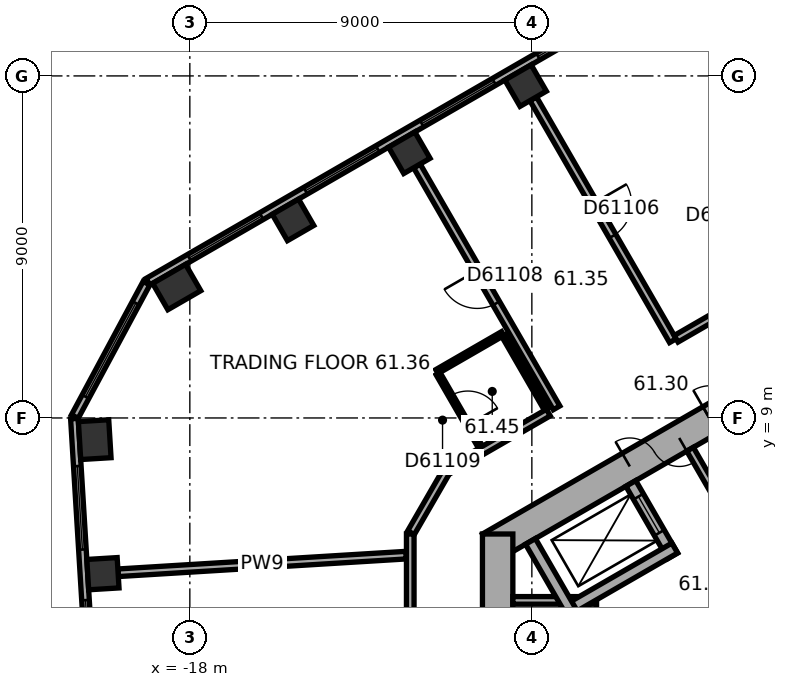
"""IFC4 building model, lengths in metres.
Left out: names, types, materials, properties, quantities, classifications, styles, units other than length and angle.
Written with IfcOpenShell. Run it as: python <this file> out.ifc"""

import sys

from ifc_helpers import new_model, si_unit, direction, frame, frame_2d, origin, origin_2d, place, context, subcontext, project, spatial, rectangle, extrude, element, fill, save


model = new_model("IFC4")
c1 = context("Model", 3, precision=1e-05, world=origin(), true_north=direction((0.0, 1.0)))
c2 = subcontext(c1, "Body", "Model", "MODEL_VIEW")
j1 = project(units=[si_unit("LENGTHUNIT", "METRE"), si_unit("PLANEANGLEUNIT", "RADIAN")], contexts=[c1])
p1 = place(None, origin())
s1 = spatial("IfcSite", under=j1, at=p1, CompositionType="ELEMENT")
p2 = place(p1, origin())
s2 = spatial("IfcBuilding", under=s1, at=p2, CompositionType="ELEMENT")
p3 = place(p2, frame((0.0, 0.0, 247.6)))
s3 = spatial("IfcBuildingStorey", under=s2, at=p3, CompositionType="ELEMENT", Elevation=247.6)
for number, where, z_axis, x_axis in (
    (1, (-9.165, 17.745, 0.0), (0.0, 0.0, 1.0), (-0.866, -0.5, 0.0)),
    (2, (-12.225, 15.978, 0.0), (0.0, 0.0, 1.0), (-0.866, -0.5, 0.0)),
    (3, (-15.285, 14.211, 0.0), (0.0, 0.0, 1.0), (-0.866, -0.5, 0.0)),
):
    element("IfcColumn", number, at=place(p3, frame(where, z_axis=z_axis, x_axis=x_axis)), inside=s3, PredefinedType="COLUMN", context=c2, shape_type="SweptSolid", body=[
        extrude(rectangle(XDim=0.8, YDim=0.8, at=origin_2d()), origin(), (0.0, 0.0, 1.0), 3.7),
    ])
for number, where, z_axis, x_axis in (
    (4, (-18.345, 12.445, 0.0), (0.0, 0.0, 1.0), (-0.866, -0.5, 0.0)),
    (5, (-20.503, 8.429, 0.0), (0.0, 0.0, 1.0), (0.061, -0.998, 0.0)),
):
    element("IfcColumn", number, at=place(p3, frame(where, z_axis=z_axis, x_axis=x_axis)), inside=s3, PredefinedType="COLUMN", context=c2, shape_type="SweptSolid", body=[
        extrude(rectangle(XDim=1.0, YDim=0.8, at=origin_2d()), origin(), (0.0, 0.0, 1.0), 3.7),
    ])
p4 = place(p3, frame((-20.287, 4.902, 0.0), z_axis=(0.0, 0.0, 1.0), x_axis=(0.061048539535, -0.998134798422, 0.0)))
e6 = element("IfcColumn", 6, at=p4, inside=s3, PredefinedType="COLUMN", context=c2, shape_type="SweptSolid", body=[
    extrude(rectangle(XDim=0.8, YDim=0.8, at=origin_2d()), origin(), (0.0, 0.0, 1.0), 3.7),
])
p5 = place(p3, frame((0.2, 11.547, 0.0), z_axis=(0.0, 0.0, 1.0), x_axis=(-0.866023897231, -0.500002609418, 0.0)))
e7 = element("IfcWall", 7, at=p5, inside=s3, PredefinedType="SHEAR", context=c2, shape_type="SweptSolid", body=[
    extrude(rectangle(XDim=11.894, YDim=0.8, at=frame_2d((5.947, 0.0))), origin(), (0.0, 0.0, 1.0), 3.7),
])
p6 = place(p5, frame((6.147, 0.0, 0.0)))
e8 = element("IfcOpeningElement", 8, at=p6, cuts=e7, PredefinedType="OPENING", context=c2, shape_type="SweptSolid", body=[
    extrude(rectangle(XDim=1.5, YDim=2.1, at=frame_2d((0.75, 1.05))), frame((0.0, 0.41, 0.0), z_axis=(0.0, -1.0, 0.0), x_axis=(1.0, 0.0, 0.0)), (0.0, 0.0, 1.0), 0.82),
])
p7 = place(p5, frame((1.697, 0.0, 0.0)))
e9 = element("IfcOpeningElement", 9, at=p7, cuts=e7, PredefinedType="OPENING", context=c2, shape_type="SweptSolid", body=[
    extrude(rectangle(XDim=0.9, YDim=2.1, at=frame_2d((0.45, 1.05))), frame((0.0, 0.41, 0.0), z_axis=(0.0, -1.0, 0.0), x_axis=(1.0, 0.0, 0.0)), (0.0, 0.0, 1.0), 0.82),
])
p8 = place(p5, frame((4.297, 0.0, 0.0)))
e10 = element("IfcOpeningElement", 10, at=p8, cuts=e7, PredefinedType="OPENING", context=c2, shape_type="SweptSolid", body=[
    extrude(rectangle(XDim=0.9, YDim=2.1, at=frame_2d((0.45, 1.05))), frame((0.0, 0.41, 0.0), z_axis=(0.0, -1.0, 0.0), x_axis=(1.0, 0.0, 0.0)), (0.0, 0.0, 1.0), 0.82),
])
p9 = place(p3, frame((-9.9, 5.947, 0.0), z_axis=(0.0, 0.0, 1.0), x_axis=(0.0, -1.0, 0.0)))
e11 = element("IfcWall", 11, at=p9, inside=s3, PredefinedType="SHEAR", context=c2, shape_type="SweptSolid", body=[
    extrude(rectangle(XDim=11.894, YDim=0.8, at=frame_2d((5.947, 0.0))), origin(), (0.0, 0.0, 1.0), 3.7),
])
p10 = place(p9, frame((5.097, 0.0, 0.0)))
e12 = element("IfcOpeningElement", 12, at=p10, cuts=e11, PredefinedType="OPENING", context=c2, shape_type="SweptSolid", body=[
    extrude(rectangle(XDim=1.1, YDim=2.1, at=frame_2d((0.55, 1.05))), frame((0.0, 0.41, 0.0), z_axis=(0.0, -1.0, 0.0), x_axis=(1.0, 0.0, 0.0)), (0.0, 0.0, 1.0), 0.82),
])
p11 = place(p9, frame((7.697, 0.0, 0.0)))
e13 = element("IfcOpeningElement", 13, at=p11, cuts=e11, PredefinedType="OPENING", context=c2, shape_type="SweptSolid", body=[
    extrude(rectangle(XDim=1.1, YDim=2.1, at=frame_2d((0.55, 1.05))), frame((0.0, 0.41, 0.0), z_axis=(0.0, -1.0, 0.0), x_axis=(1.0, 0.0, 0.0)), (0.0, 0.0, 1.0), 0.82),
])
p12 = place(p3, frame((-2.786, 22.005, 0.0), z_axis=(0.0, 0.0, 1.0), x_axis=(-0.866026555358, -0.49999800541, 0.0)))
e14 = element("IfcWall", 14, at=p12, inside=s3, PredefinedType="STANDARD", context=c2, shape_type="SweptSolid", body=[
    extrude(rectangle(XDim=18.841, YDim=0.2, at=frame_2d((9.421, 0.0))), origin(), (0.0, 0.0, 1.0), 3.7),
])
p13 = place(p12, frame((1.254, 0.0, 0.9)))
e15 = element("IfcOpeningElement", 15, at=p13, cuts=e14, PredefinedType="OPENING", context=c2, shape_type="SweptSolid", body=[
    extrude(rectangle(XDim=2.2, YDim=2.0, at=frame_2d((1.1, 1.0))), frame((0.0, 0.11, 0.0), z_axis=(0.0, -1.0, 0.0), x_axis=(1.0, 0.0, 0.0)), (0.0, 0.0, 1.0), 0.22),
])
p14 = place(p12, frame((4.788, 0.0, 0.9)))
e16 = element("IfcOpeningElement", 16, at=p14, cuts=e14, PredefinedType="OPENING", context=c2, shape_type="SweptSolid", body=[
    extrude(rectangle(XDim=2.2, YDim=2.0, at=frame_2d((1.1, 1.0))), frame((0.0, 0.11, 0.0), z_axis=(0.0, -1.0, 0.0), x_axis=(1.0, 0.0, 0.0)), (0.0, 0.0, 1.0), 0.22),
])
p15 = place(p12, frame((8.321, 0.0, 0.9)))
e17 = element("IfcOpeningElement", 17, at=p15, cuts=e14, PredefinedType="OPENING", context=c2, shape_type="SweptSolid", body=[
    extrude(rectangle(XDim=2.2, YDim=2.0, at=frame_2d((1.1, 1.0))), frame((0.0, 0.11, 0.0), z_axis=(0.0, -1.0, 0.0), x_axis=(1.0, 0.0, 0.0)), (0.0, 0.0, 1.0), 0.22),
])
p16 = place(p12, frame((11.855, 0.0, 0.9)))
e18 = element("IfcOpeningElement", 18, at=p16, cuts=e14, PredefinedType="OPENING", context=c2, shape_type="SweptSolid", body=[
    extrude(rectangle(XDim=2.2, YDim=2.0, at=frame_2d((1.1, 1.0))), frame((0.0, 0.11, 0.0), z_axis=(0.0, -1.0, 0.0), x_axis=(1.0, 0.0, 0.0)), (0.0, 0.0, 1.0), 0.22),
])
p17 = place(p12, frame((15.389, 0.0, 0.9)))
e19 = element("IfcOpeningElement", 19, at=p17, cuts=e14, PredefinedType="OPENING", context=c2, shape_type="SweptSolid", body=[
    extrude(rectangle(XDim=2.2, YDim=2.0, at=frame_2d((1.1, 1.0))), frame((0.0, 0.11, 0.0), z_axis=(0.0, -1.0, 0.0), x_axis=(1.0, 0.0, 0.0)), (0.0, 0.0, 1.0), 0.22),
])
p18 = place(p3, frame((-19.141, 12.545, 0.0), z_axis=(0.0, 0.0, 1.0), x_axis=(-0.473306370921, -0.880897882416, 0.0)))
e20 = element("IfcWall", 20, at=p18, inside=s3, PredefinedType="STANDARD", context=c2, shape_type="SweptSolid", body=[
    extrude(rectangle(XDim=3.983, YDim=0.2, at=frame_2d((1.991, 0.0))), origin(), (0.0, 0.0, 1.0), 3.7),
])
p19 = place(p18, frame((0.591, 0.0, 0.9)))
e21 = element("IfcOpeningElement", 21, at=p19, cuts=e20, PredefinedType="OPENING", context=c2, shape_type="SweptSolid", body=[
    extrude(rectangle(XDim=2.8, YDim=2.0, at=frame_2d((1.4, 1.0))), frame((0.0, 0.11, 0.0), z_axis=(0.0, -1.0, 0.0), x_axis=(1.0, 0.0, 0.0)), (0.0, 0.0, 1.0), 0.22),
])
p20 = place(p3, frame((-21.038, 8.984, 0.0), z_axis=(0.0, 0.0, 1.0), x_axis=(0.061043935634, -0.998135079998, 0.0)))
e22 = element("IfcWall", 22, at=p20, inside=s3, PredefinedType="STANDARD", context=c2, shape_type="SweptSolid", body=[
    extrude(rectangle(XDim=18.841, YDim=0.2, at=frame_2d((9.421, 0.0))), origin(), (0.0, 0.0, 1.0), 3.7),
])
p21 = place(p20, frame((1.253, 0.0, 0.9)))
e23 = element("IfcOpeningElement", 23, at=p21, cuts=e22, PredefinedType="OPENING", context=c2, shape_type="SweptSolid", body=[
    extrude(rectangle(XDim=2.2, YDim=2.0, at=frame_2d((1.1, 1.0))), frame((0.0, 0.11, 0.0), z_axis=(0.0, -1.0, 0.0), x_axis=(1.0, 0.0, 0.0)), (0.0, 0.0, 1.0), 0.22),
])
p22 = place(p20, frame((4.786, 0.0, 0.9)))
e24 = element("IfcOpeningElement", 24, at=p22, cuts=e22, PredefinedType="OPENING", context=c2, shape_type="SweptSolid", body=[
    extrude(rectangle(XDim=2.2, YDim=2.0, at=frame_2d((1.1, 1.0))), frame((0.0, 0.11, 0.0), z_axis=(0.0, -1.0, 0.0), x_axis=(1.0, 0.0, 0.0)), (0.0, 0.0, 1.0), 0.22),
])
p23 = place(p20, frame((8.32, 0.0, 0.9)))
e25 = element("IfcOpeningElement", 25, at=p23, cuts=e22, PredefinedType="OPENING", context=c2, shape_type="SweptSolid", body=[
    extrude(rectangle(XDim=2.2, YDim=2.0, at=frame_2d((1.1, 1.0))), frame((0.0, 0.11, 0.0), z_axis=(0.0, -1.0, 0.0), x_axis=(1.0, 0.0, 0.0)), (0.0, 0.0, 1.0), 0.22),
])
p24 = place(p20, frame((11.854, 0.0, 0.9)))
e26 = element("IfcOpeningElement", 26, at=p24, cuts=e22, PredefinedType="OPENING", context=c2, shape_type="SweptSolid", body=[
    extrude(rectangle(XDim=2.2, YDim=2.0, at=frame_2d((1.1, 1.0))), frame((0.0, 0.11, 0.0), z_axis=(0.0, -1.0, 0.0), x_axis=(1.0, 0.0, 0.0)), (0.0, 0.0, 1.0), 0.22),
])
p25 = place(p20, frame((15.387, 0.0, 0.9)))
e27 = element("IfcOpeningElement", 27, at=p25, cuts=e22, PredefinedType="OPENING", context=c2, shape_type="SweptSolid", body=[
    extrude(rectangle(XDim=2.2, YDim=2.0, at=frame_2d((1.1, 1.0))), frame((0.0, 0.11, 0.0), z_axis=(0.0, -1.0, 0.0), x_axis=(1.0, 0.0, 0.0)), (0.0, 0.0, 1.0), 0.22),
])
p26 = place(p3, frame((-3.737, 6.272, 0.0), z_axis=(0.0, 0.0, 1.0), x_axis=(-0.50002983664, 0.866008176907, 0.0)))
e28 = element("IfcWall", 28, at=p26, inside=s3, PredefinedType="PARTITIONING", context=c2, shape_type="SweptSolid", body=[
    extrude(rectangle(XDim=2.2, YDim=0.2, at=frame_2d((1.1, 0.0))), origin(), (0.0, 0.0, 1.0), 3.42),
])
p27 = place(p3, frame((-7.4, 4.3, 0.0), z_axis=(0.0, 0.0, 1.0), x_axis=(0.0, -1.0, 0.0)))
e29 = element("IfcWall", 29, at=p27, inside=s3, PredefinedType="PARTITIONING", context=c2, shape_type="SweptSolid", body=[
    extrude(rectangle(XDim=8.0, YDim=0.2, at=frame_2d((4.0, 0.0))), origin(), (0.0, 0.0, 1.0), 3.42),
])
p28 = place(p3, frame((-7.3, 4.2, 0.0), z_axis=(0.0, 0.0, 1.0), x_axis=(-1.0, 0.0, 0.0)))
e30 = element("IfcWall", 30, at=p28, inside=s3, PredefinedType="PARTITIONING", context=c2, shape_type="SweptSolid", body=[
    extrude(rectangle(XDim=2.2, YDim=0.2, at=frame_2d((1.1, 0.0))), origin(), (0.0, 0.0, 1.0), 3.42),
])
p29 = place(p3, frame((-5.295, 5.372, 0.0), z_axis=(0.0, 0.0, 1.0), x_axis=(-0.500077893725, 0.86598042715, 0.0)))
e31 = element("IfcWall", 31, at=p29, inside=s3, PredefinedType="SHEAR", context=c2, shape_type="SweptSolid", body=[
    extrude(rectangle(XDim=2.2, YDim=0.3, at=frame_2d((1.1, 0.0))), origin(), (0.0, 0.0, 1.0), 3.42),
])
p30 = place(p29, frame((0.7, 0.0, 0.0)))
e32 = element("IfcOpeningElement", 32, at=p30, cuts=e31, PredefinedType="OPENING", context=c2, shape_type="SweptSolid", body=[
    extrude(rectangle(XDim=1.1, YDim=2.1, at=frame_2d((0.55, 1.05))), frame((0.0, 0.16, 0.0), z_axis=(0.0, -1.0, 0.0), x_axis=(1.0, 0.0, 0.0)), (0.0, 0.0, 1.0), 0.32),
])
p31 = place(p3, frame((-5.24, 5.577, 0.0), z_axis=(0.0, 0.0, 1.0), x_axis=(-0.866014461049, -0.500018952895, 0.0)))
e33 = element("IfcWall", 33, at=p31, inside=s3, PredefinedType="SHEAR", context=c2, shape_type="SweptSolid", body=[
    extrude(rectangle(XDim=3.35, YDim=0.3, at=frame_2d((1.675, 0.0))), origin(), (0.0, 0.0, 1.0), 3.42),
])
p32 = place(p3, frame((-7.937, 3.847, 0.0), z_axis=(0.0, 0.0, 1.0), x_axis=(-0.50002983664, 0.866008176907, 0.0)))
e34 = element("IfcWall", 34, at=p32, inside=s3, PredefinedType="SHEAR", context=c2, shape_type="SweptSolid", body=[
    extrude(rectangle(XDim=2.2, YDim=0.3, at=frame_2d((1.1, 0.0))), origin(), (0.0, 0.0, 1.0), 3.42),
])
p33 = place(p3, frame((-19.888, 4.927, 0.0), z_axis=(0.0, 0.0, 1.0), x_axis=(0.998133794525, 0.061064950896, 0.0)))
e35 = element("IfcWall", 35, at=p33, inside=s3, PredefinedType="PARTITIONING", context=c2, shape_type="SweptSolid", body=[
    extrude(rectangle(XDim=7.592, YDim=0.2, at=frame_2d((3.796, 0.0))), origin(), (0.0, 0.0, 1.0), 3.42),
])
p34 = place(p3, frame((-12.2, 5.947, 0.0), z_axis=(0.0, 0.0, 1.0), x_axis=(0.0, -1.0, 0.0)))
e36 = element("IfcWall", 36, at=p34, inside=s3, PredefinedType="PARTITIONING", context=c2, shape_type="SweptSolid", body=[
    extrude(rectangle(XDim=3.746, YDim=0.2, at=frame_2d((1.873, 0.0))), origin(), (0.0, 0.0, 1.0), 3.42),
])
p35 = place(p3, frame((-12.025, 15.632, 0.0), z_axis=(0.0, 0.0, 1.0), x_axis=(0.499983153418, -0.866035129944, 0.0)))
e37 = element("IfcWall", 37, at=p35, inside=s3, PredefinedType="PARTITIONING", context=c2, shape_type="SweptSolid", body=[
    extrude(rectangle(XDim=7.35, YDim=0.2, at=frame_2d((3.675, 0.0))), origin(), (0.0, 0.0, 1.0), 3.42),
])
p36 = place(p35, frame((3.175, 0.0, 0.0)))
e38 = element("IfcOpeningElement", 38, at=p36, cuts=e37, PredefinedType="OPENING", context=c2, shape_type="SweptSolid", body=[
    extrude(rectangle(XDim=1.0, YDim=2.1, at=frame_2d((0.5, 1.05))), frame((0.0, 0.11, 0.0), z_axis=(0.0, -1.0, 0.0), x_axis=(1.0, 0.0, 0.0)), (0.0, 0.0, 1.0), 0.22),
])
p37 = place(p3, frame((-11.499, 10.22, 0.0), z_axis=(0.0, 0.0, 1.0), x_axis=(0.866010750942, 0.50002537861, 0.0)))
e39 = element("IfcWall", 39, at=p37, inside=s3, PredefinedType="PARTITIONING", context=c2, shape_type="SweptSolid", body=[
    extrude(rectangle(XDim=2.0, YDim=0.12, at=frame_2d((1.0, 0.0))), origin(), (0.0, 0.0, 1.0), 3.42),
])
p38 = place(p3, frame((-11.25, 7.592, 0.0), z_axis=(0.0, 0.0, 1.0), x_axis=(-0.499964847546, -0.866045698112, 0.0)))
e40 = element("IfcWall", 40, at=p38, inside=s3, PredefinedType="PARTITIONING", context=c2, shape_type="SweptSolid", body=[
    extrude(rectangle(XDim=1.86, YDim=0.2, at=frame_2d((0.93, 0.0))), origin(), (0.0, 0.0, 1.0), 3.42),
])
p39 = place(p3, frame((-10.348, 8.228, 0.0), z_axis=(0.0, 0.0, 1.0), x_axis=(-0.500030632641, 0.866007717299, 0.0)))
e41 = element("IfcWall", 41, at=p39, inside=s3, PredefinedType="PARTITIONING", context=c2, shape_type="SweptSolid", body=[
    extrude(rectangle(XDim=2.24, YDim=0.12, at=frame_2d((1.12, 0.0))), origin(), (0.0, 0.0, 1.0), 3.42),
])
p40 = place(p39, frame((0.67, 0.0, 0.0)))
e42 = element("IfcOpeningElement", 42, at=p40, cuts=e41, PredefinedType="OPENING", context=c2, shape_type="SweptSolid", body=[
    extrude(rectangle(XDim=0.9, YDim=2.1, at=frame_2d((0.45, 1.05))), frame((0.0, 0.07, 0.0), z_axis=(0.0, -1.0, 0.0), x_axis=(1.0, 0.0, 0.0)), (0.0, 0.0, 1.0), 0.14),
])
p41 = place(p3, frame((-9.737, 11.168, 0.0), z_axis=(0.0, 0.0, 1.0), x_axis=(0.500030632641, -0.866007717299, 0.0)))
e43 = element("IfcWall", 43, at=p41, inside=s3, PredefinedType="PARTITIONING", context=c2, shape_type="SweptSolid", body=[
    extrude(rectangle(XDim=2.24, YDim=0.12, at=frame_2d((1.12, 0.0))), origin(), (0.0, 0.0, 1.0), 3.42),
])
p42 = place(p3, frame((-8.965, 17.399, 0.0), z_axis=(0.0, 0.0, 1.0), x_axis=(0.499993683172, -0.866029050776, 0.0)))
e44 = element("IfcWall", 44, at=p42, inside=s3, PredefinedType="PARTITIONING", context=c2, shape_type="SweptSolid", body=[
    extrude(rectangle(XDim=7.35, YDim=0.2, at=frame_2d((3.675, 0.0))), origin(), (0.0, 0.0, 1.0), 2.87),
])
p43 = place(p42, frame((3.175, 0.0, 0.0)))
e45 = element("IfcOpeningElement", 45, at=p43, cuts=e44, PredefinedType="OPENING", context=c2, shape_type="SweptSolid", body=[
    extrude(rectangle(XDim=1.0, YDim=2.1, at=frame_2d((0.5, 1.05))), frame((0.0, 0.11, 0.0), z_axis=(0.0, -1.0, 0.0), x_axis=(1.0, 0.0, 0.0)), (0.0, 0.0, 1.0), 0.22),
])
p44 = place(p3, frame((-8.566, 9.142, 0.0), z_axis=(0.0, 0.0, 1.0), x_axis=(-0.865999496279, -0.500044870432, 0.0)))
e46 = element("IfcWall", 46, at=p44, inside=s3, PredefinedType="PARTITIONING", context=c2, shape_type="SweptSolid", body=[
    extrude(rectangle(XDim=3.059, YDim=0.2, at=frame_2d((1.529, 0.0))), origin(), (0.0, 0.0, 1.0), 3.42),
])
p45 = place(p3, frame((-1.167, 13.414, 0.0), z_axis=(0.0, 0.0, 1.0), x_axis=(-0.866023347809, -0.500003561037, 0.0)))
e47 = element("IfcWall", 47, at=p45, inside=s3, PredefinedType="PARTITIONING", context=c2, shape_type="SweptSolid", body=[
    extrude(rectangle(XDim=4.661, YDim=0.2, at=frame_2d((2.331, 0.0))), origin(), (0.0, 0.0, 1.0), 3.42),
])
p46 = place(p14, origin())
e48 = element("IfcWindow", 48, at=p46, inside=s3, PartitioningType="SINGLE_PANEL", PredefinedType="WINDOW", context=c2, shape_type="SweptSolid", body=[
    extrude(rectangle(XDim=2.2, YDim=2.0, at=frame_2d((1.1, 1.0))), frame((0.0, 0.03, 0.0), z_axis=(0.0, -1.0, 0.0), x_axis=(1.0, 0.0, 0.0)), (0.0, 0.0, 1.0), 0.06),
])
fill(e16, e48)
p47 = place(p15, origin())
e49 = element("IfcWindow", 49, at=p47, inside=s3, PartitioningType="SINGLE_PANEL", PredefinedType="WINDOW", context=c2, shape_type="SweptSolid", body=[
    extrude(rectangle(XDim=2.2, YDim=2.0, at=frame_2d((1.1, 1.0))), frame((0.0, 0.03, 0.0), z_axis=(0.0, -1.0, 0.0), x_axis=(1.0, 0.0, 0.0)), (0.0, 0.0, 1.0), 0.06),
])
fill(e17, e49)
p48 = place(p16, origin())
e50 = element("IfcWindow", 50, at=p48, inside=s3, PartitioningType="SINGLE_PANEL", PredefinedType="WINDOW", context=c2, shape_type="SweptSolid", body=[
    extrude(rectangle(XDim=2.2, YDim=2.0, at=frame_2d((1.1, 1.0))), frame((0.0, 0.03, 0.0), z_axis=(0.0, -1.0, 0.0), x_axis=(1.0, 0.0, 0.0)), (0.0, 0.0, 1.0), 0.06),
])
fill(e18, e50)
p49 = place(p17, origin())
e51 = element("IfcWindow", 51, at=p49, inside=s3, PartitioningType="SINGLE_PANEL", PredefinedType="WINDOW", context=c2, shape_type="SweptSolid", body=[
    extrude(rectangle(XDim=2.2, YDim=2.0, at=frame_2d((1.1, 1.0))), frame((0.0, 0.03, 0.0), z_axis=(0.0, -1.0, 0.0), x_axis=(1.0, 0.0, 0.0)), (0.0, 0.0, 1.0), 0.06),
])
fill(e19, e51)
p50 = place(p19, origin())
e52 = element("IfcWindow", 52, at=p50, inside=s3, PartitioningType="SINGLE_PANEL", PredefinedType="WINDOW", context=c2, shape_type="SweptSolid", body=[
    extrude(rectangle(XDim=2.8, YDim=2.0, at=frame_2d((1.4, 1.0))), frame((0.0, 0.03, 0.0), z_axis=(0.0, -1.0, 0.0), x_axis=(1.0, 0.0, 0.0)), (0.0, 0.0, 1.0), 0.06),
])
fill(e21, e52)
p51 = place(p21, origin())
e53 = element("IfcWindow", 53, at=p51, inside=s3, PartitioningType="SINGLE_PANEL", PredefinedType="WINDOW", context=c2, shape_type="SweptSolid", body=[
    extrude(rectangle(XDim=2.2, YDim=2.0, at=frame_2d((1.1, 1.0))), frame((0.0, 0.03, 0.0), z_axis=(0.0, -1.0, 0.0), x_axis=(1.0, 0.0, 0.0)), (0.0, 0.0, 1.0), 0.06),
])
fill(e23, e53)
p52 = place(p22, origin())
e54 = element("IfcWindow", 54, at=p52, inside=s3, PartitioningType="SINGLE_PANEL", PredefinedType="WINDOW", context=c2, shape_type="SweptSolid", body=[
    extrude(rectangle(XDim=2.2, YDim=2.0, at=frame_2d((1.1, 1.0))), frame((0.0, 0.03, 0.0), z_axis=(0.0, -1.0, 0.0), x_axis=(1.0, 0.0, 0.0)), (0.0, 0.0, 1.0), 0.06),
])
fill(e24, e54)
p53 = place(p6, origin())
e55 = element("IfcDoor", 55, at=p53, inside=s3, OperationType="DOUBLE_DOOR_SINGLE_SWING", PredefinedType="DOOR", context=c2, shape_type="SweptSolid", body=[
    extrude(rectangle(XDim=1.5, YDim=2.1, at=frame_2d((0.75, 1.05))), frame((0.0, 0.025, 0.0), z_axis=(0.0, -1.0, 0.0), x_axis=(1.0, 0.0, 0.0)), (0.0, 0.0, 1.0), 0.05),
])
fill(e8, e55)
p54 = place(p30, origin())
e56 = element("IfcDoor", 56, at=p54, inside=s3, OperationType="DOUBLE_DOOR_SLIDING", PredefinedType="DOOR", context=c2, shape_type="SweptSolid", body=[
    extrude(rectangle(XDim=1.1, YDim=2.1, at=frame_2d((0.55, 1.05))), frame((0.0, 0.025, 0.0), z_axis=(0.0, -1.0, 0.0), x_axis=(1.0, 0.0, 0.0)), (0.0, 0.0, 1.0), 0.05),
])
fill(e32, e56)
p55 = place(p43, origin())
e57 = element("IfcDoor", 57, at=p55, inside=s3, OperationType="SINGLE_SWING_LEFT", PredefinedType="DOOR", context=c2, shape_type="SweptSolid", body=[
    extrude(rectangle(XDim=1.0, YDim=2.1, at=frame_2d((0.5, 1.05))), frame((0.0, 0.025, 0.0), z_axis=(0.0, -1.0, 0.0), x_axis=(1.0, 0.0, 0.0)), (0.0, 0.0, 1.0), 0.05),
])
fill(e45, e57)
p56 = place(p36, origin())
e58 = element("IfcDoor", 58, at=p56, inside=s3, OperationType="SINGLE_SWING_LEFT", PredefinedType="DOOR", context=c2, shape_type="SweptSolid", body=[
    extrude(rectangle(XDim=1.0, YDim=2.1, at=frame_2d((0.5, 1.05))), frame((0.0, 0.025, 0.0), z_axis=(0.0, -1.0, 0.0), x_axis=(1.0, 0.0, 0.0)), (0.0, 0.0, 1.0), 0.05),
])
fill(e38, e58)
p57 = place(p40, origin())
e59 = element("IfcDoor", 59, at=p57, inside=s3, OperationType="SINGLE_SWING_LEFT", PredefinedType="DOOR", context=c2, shape_type="SweptSolid", body=[
    extrude(rectangle(XDim=0.9, YDim=2.1, at=frame_2d((0.45, 1.05))), frame((0.0, 0.025, 0.0), z_axis=(0.0, -1.0, 0.0), x_axis=(1.0, 0.0, 0.0)), (0.0, 0.0, 1.0), 0.05),
])
fill(e42, e59)
save(model, sys.argv[1])
